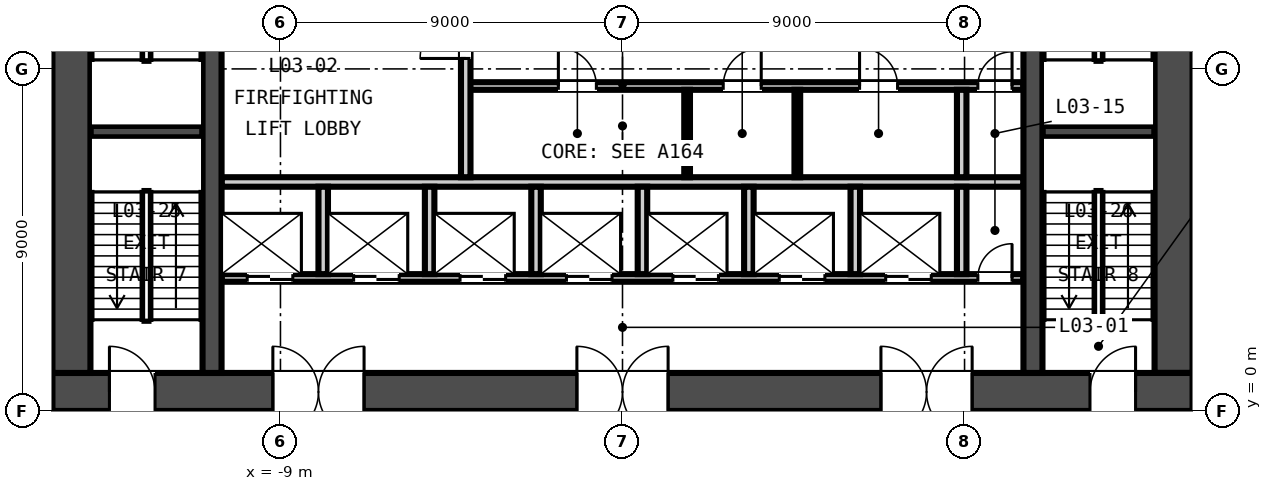
"""IFC4 building model, lengths in metres.
Left out: names, types, materials, properties, quantities, classifications, styles, units other than length and angle.
Written with IfcOpenShell. Run it as: python <this file> out.ifc"""

import sys

from ifc_helpers import new_model, si_unit, direction, frame, frame_2d, origin, place, context, subcontext, project, spatial, rectangle, extrude, element, fill, save


model = new_model("IFC4")
c1 = context("Model", 3, precision=1e-05, world=origin(), true_north=direction((0.0, 1.0)))
c2 = subcontext(c1, "Body", "Model", "MODEL_VIEW")
j1 = project(units=[si_unit("LENGTHUNIT", "METRE"), si_unit("PLANEANGLEUNIT", "RADIAN")], contexts=[c1])
p1 = place(None, origin())
s1 = spatial("IfcSite", under=j1, at=p1, CompositionType="ELEMENT")
p2 = place(p1, origin())
s2 = spatial("IfcBuilding", under=s1, at=p2, CompositionType="ELEMENT")
p3 = place(p2, frame((0.0, 0.0, 22.5)))
s3 = spatial("IfcBuildingStorey", under=s2, at=p3, CompositionType="ELEMENT", Elevation=22.5)
p4 = place(p3, frame((-15.0, 0.5, -0.3), z_axis=(0.0, 0.0, 1.0), x_axis=(1.0, 0.0, 0.0)))
e1 = element("IfcWall", 1, at=p4, inside=s3, PredefinedType="SOLIDWALL", context=c2, shape_type="SweptSolid", body=[
    extrude(rectangle(XDim=30.0, YDim=1.0, at=frame_2d((15.0, 0.0))), origin(), (0.0, 0.0, 1.0), 4.5),
])
p5 = place(p4, frame((5.8, 0.0, 0.3)))
e2 = element("IfcOpeningElement", 2, at=p5, cuts=e1, PredefinedType="OPENING", context=c2, shape_type="SweptSolid", body=[
    extrude(rectangle(XDim=2.4, YDim=2.4, at=frame_2d((1.2, 1.2))), frame((0.0, 0.51, 0.0), z_axis=(0.0, -1.0, 0.0), x_axis=(1.0, 0.0, 0.0)), (0.0, 0.0, 1.0), 1.02),
])
p6 = place(p4, frame((13.8, 0.0, 0.3)))
e3 = element("IfcOpeningElement", 3, at=p6, cuts=e1, PredefinedType="OPENING", context=c2, shape_type="SweptSolid", body=[
    extrude(rectangle(XDim=2.4, YDim=2.4, at=frame_2d((1.2, 1.2))), frame((0.0, 0.51, 0.0), z_axis=(0.0, -1.0, 0.0), x_axis=(1.0, 0.0, 0.0)), (0.0, 0.0, 1.0), 1.02),
])
p7 = place(p4, frame((21.8, 0.0, 0.3)))
e4 = element("IfcOpeningElement", 4, at=p7, cuts=e1, PredefinedType="OPENING", context=c2, shape_type="SweptSolid", body=[
    extrude(rectangle(XDim=2.4, YDim=2.4, at=frame_2d((1.2, 1.2))), frame((0.0, 0.51, 0.0), z_axis=(0.0, -1.0, 0.0), x_axis=(1.0, 0.0, 0.0)), (0.0, 0.0, 1.0), 1.02),
])
p8 = place(p4, frame((1.5, 0.0, 0.3)))
e5 = element("IfcOpeningElement", 5, at=p8, cuts=e1, PredefinedType="OPENING", context=c2, shape_type="SweptSolid", body=[
    extrude(rectangle(XDim=1.2, YDim=2.1, at=frame_2d((0.6, 1.05))), frame((0.0, 0.51, 0.0), z_axis=(0.0, -1.0, 0.0), x_axis=(1.0, 0.0, 0.0)), (0.0, 0.0, 1.0), 1.02),
])
p9 = place(p4, frame((27.3, 0.0, 0.3)))
e6 = element("IfcOpeningElement", 6, at=p9, cuts=e1, PredefinedType="OPENING", context=c2, shape_type="SweptSolid", body=[
    extrude(rectangle(XDim=1.2, YDim=2.1, at=frame_2d((0.6, 1.05))), frame((0.0, 0.51, 0.0), z_axis=(0.0, -1.0, 0.0), x_axis=(1.0, 0.0, 0.0)), (0.0, 0.0, 1.0), 1.02),
])
for number, where, z_axis, x_axis in (
    (7, (-14.5, 1.0, -0.3), (0.0, 0.0, 1.0), (0.0, 1.0, 0.0)),
    (8, (14.5, 1.0, -0.3), (0.0, 0.0, 1.0), (0.0, 1.0, 0.0)),
):
    element("IfcWall", number, at=place(p3, frame(where, z_axis=z_axis, x_axis=x_axis)), inside=s3, PredefinedType="SOLIDWALL", context=c2, shape_type="SweptSolid", body=[
        extrude(rectangle(XDim=13.0, YDim=1.0, at=frame_2d((6.5, 0.0))), origin(), (0.0, 0.0, 1.0), 4.5),
    ])
for number, where, z_axis, x_axis in (
    (9, (-10.8, 1.0, -0.3), (0.0, 0.0, 1.0), (0.0, 1.0, 0.0)),
    (10, (10.8, 1.0, -0.3), (0.0, 0.0, 1.0), (0.0, 1.0, 0.0)),
):
    element("IfcWall", number, at=place(p3, frame(where, z_axis=z_axis, x_axis=x_axis)), inside=s3, PredefinedType="SOLIDWALL", context=c2, shape_type="SweptSolid", body=[
        extrude(rectangle(XDim=13.0, YDim=0.5, at=frame_2d((6.5, 0.0))), origin(), (0.0, 0.0, 1.0), 4.5),
    ])
p10 = place(p3, frame((-10.55, 3.5, 0.0), z_axis=(0.0, 0.0, 1.0), x_axis=(1.0, 0.0, 0.0)))
e11 = element("IfcWall", 11, at=p10, inside=s3, PredefinedType="PARTITIONING", context=c2, shape_type="SweptSolid", body=[
    extrude(rectangle(XDim=21.1, YDim=0.2, at=frame_2d((10.55, 0.0))), origin(), (0.0, 0.0, 1.0), 4.2),
])
p11 = place(p10, frame((0.675, 0.0, 0.0)))
e12 = element("IfcOpeningElement", 12, at=p11, cuts=e11, PredefinedType="OPENING", context=c2, shape_type="SweptSolid", body=[
    extrude(rectangle(XDim=1.2, YDim=2.1, at=frame_2d((0.6, 1.05))), frame((0.0, 0.11, 0.0), z_axis=(0.0, -1.0, 0.0), x_axis=(1.0, 0.0, 0.0)), (0.0, 0.0, 1.0), 0.22),
])
p12 = place(p10, frame((3.475, 0.0, 0.0)))
e13 = element("IfcOpeningElement", 13, at=p12, cuts=e11, PredefinedType="OPENING", context=c2, shape_type="SweptSolid", body=[
    extrude(rectangle(XDim=1.2, YDim=2.1, at=frame_2d((0.6, 1.05))), frame((0.0, 0.11, 0.0), z_axis=(0.0, -1.0, 0.0), x_axis=(1.0, 0.0, 0.0)), (0.0, 0.0, 1.0), 0.22),
])
p13 = place(p10, frame((6.275, 0.0, 0.0)))
e14 = element("IfcOpeningElement", 14, at=p13, cuts=e11, PredefinedType="OPENING", context=c2, shape_type="SweptSolid", body=[
    extrude(rectangle(XDim=1.2, YDim=2.1, at=frame_2d((0.6, 1.05))), frame((0.0, 0.11, 0.0), z_axis=(0.0, -1.0, 0.0), x_axis=(1.0, 0.0, 0.0)), (0.0, 0.0, 1.0), 0.22),
])
p14 = place(p10, frame((9.075, 0.0, 0.0)))
e15 = element("IfcOpeningElement", 15, at=p14, cuts=e11, PredefinedType="OPENING", context=c2, shape_type="SweptSolid", body=[
    extrude(rectangle(XDim=1.2, YDim=2.1, at=frame_2d((0.6, 1.05))), frame((0.0, 0.11, 0.0), z_axis=(0.0, -1.0, 0.0), x_axis=(1.0, 0.0, 0.0)), (0.0, 0.0, 1.0), 0.22),
])
p15 = place(p10, frame((11.875, 0.0, 0.0)))
e16 = element("IfcOpeningElement", 16, at=p15, cuts=e11, PredefinedType="OPENING", context=c2, shape_type="SweptSolid", body=[
    extrude(rectangle(XDim=1.2, YDim=2.1, at=frame_2d((0.6, 1.05))), frame((0.0, 0.11, 0.0), z_axis=(0.0, -1.0, 0.0), x_axis=(1.0, 0.0, 0.0)), (0.0, 0.0, 1.0), 0.22),
])
p16 = place(p10, frame((14.675, 0.0, 0.0)))
e17 = element("IfcOpeningElement", 17, at=p16, cuts=e11, PredefinedType="OPENING", context=c2, shape_type="SweptSolid", body=[
    extrude(rectangle(XDim=1.2, YDim=2.1, at=frame_2d((0.6, 1.05))), frame((0.0, 0.11, 0.0), z_axis=(0.0, -1.0, 0.0), x_axis=(1.0, 0.0, 0.0)), (0.0, 0.0, 1.0), 0.22),
])
p17 = place(p10, frame((17.475, 0.0, 0.0)))
e18 = element("IfcOpeningElement", 18, at=p17, cuts=e11, PredefinedType="OPENING", context=c2, shape_type="SweptSolid", body=[
    extrude(rectangle(XDim=1.2, YDim=2.1, at=frame_2d((0.6, 1.05))), frame((0.0, 0.11, 0.0), z_axis=(0.0, -1.0, 0.0), x_axis=(1.0, 0.0, 0.0)), (0.0, 0.0, 1.0), 0.22),
])
p18 = place(p10, frame((19.9, 0.0, 0.0)))
e19 = element("IfcOpeningElement", 19, at=p18, cuts=e11, PredefinedType="OPENING", context=c2, shape_type="SweptSolid", body=[
    extrude(rectangle(XDim=0.9, YDim=2.1, at=frame_2d((0.45, 1.05))), frame((0.0, 0.11, 0.0), z_axis=(0.0, -1.0, 0.0), x_axis=(1.0, 0.0, 0.0)), (0.0, 0.0, 1.0), 0.22),
])
p19 = place(p3, frame((-10.55, 6.025, 0.0), z_axis=(0.0, 0.0, 1.0), x_axis=(1.0, 0.0, 0.0)))
e20 = element("IfcWall", 20, at=p19, inside=s3, PredefinedType="PARTITIONING", context=c2, shape_type="SweptSolid", body=[
    extrude(rectangle(XDim=21.1, YDim=0.25, at=frame_2d((10.55, 0.0))), origin(), (0.0, 0.0, 1.0), 4.2),
])
p20 = place(p3, frame((-4.125, 8.55, 0.0), z_axis=(0.0, 0.0, 1.0), x_axis=(1.0, 0.0, 0.0)))
e21 = element("IfcWall", 21, at=p20, inside=s3, PredefinedType="PARTITIONING", context=c2, shape_type="SweptSolid", body=[
    extrude(rectangle(XDim=14.675, YDim=0.2, at=frame_2d((7.337, 0.0))), origin(), (0.0, 0.0, 1.0), 4.2),
])
p21 = place(p20, frame((2.438, 0.0, 0.0)))
e22 = element("IfcOpeningElement", 22, at=p21, cuts=e21, PredefinedType="OPENING", context=c2, shape_type="SweptSolid", body=[
    extrude(rectangle(XDim=1.0, YDim=2.1, at=frame_2d((0.5, 1.05))), frame((0.0, 0.11, 0.0), z_axis=(0.0, -1.0, 0.0), x_axis=(1.0, 0.0, 0.0)), (0.0, 0.0, 1.0), 0.22),
])
p22 = place(p20, frame((6.775, 0.0, 0.0)))
e23 = element("IfcOpeningElement", 23, at=p22, cuts=e21, PredefinedType="OPENING", context=c2, shape_type="SweptSolid", body=[
    extrude(rectangle(XDim=1.0, YDim=2.1, at=frame_2d((0.5, 1.05))), frame((0.0, 0.11, 0.0), z_axis=(0.0, -1.0, 0.0), x_axis=(1.0, 0.0, 0.0)), (0.0, 0.0, 1.0), 0.22),
])
p23 = place(p20, frame((10.363, 0.0, 0.0)))
e24 = element("IfcOpeningElement", 24, at=p23, cuts=e21, PredefinedType="OPENING", context=c2, shape_type="SweptSolid", body=[
    extrude(rectangle(XDim=1.0, YDim=2.1, at=frame_2d((0.5, 1.05))), frame((0.0, 0.11, 0.0), z_axis=(0.0, -1.0, 0.0), x_axis=(1.0, 0.0, 0.0)), (0.0, 0.0, 1.0), 0.22),
])
p24 = place(p20, frame((13.475, 0.0, 0.0)))
e25 = element("IfcOpeningElement", 25, at=p24, cuts=e21, PredefinedType="OPENING", context=c2, shape_type="SweptSolid", body=[
    extrude(rectangle(XDim=0.9, YDim=2.1, at=frame_2d((0.45, 1.05))), frame((0.0, 0.11, 0.0), z_axis=(0.0, -1.0, 0.0), x_axis=(1.0, 0.0, 0.0)), (0.0, 0.0, 1.0), 0.22),
])
p25 = place(p3, frame((-4.125, 6.15, 0.0), z_axis=(0.0, 0.0, 1.0), x_axis=(0.0, 1.0, 0.0)))
e26 = element("IfcWall", 26, at=p25, inside=s3, PredefinedType="PARTITIONING", context=c2, shape_type="SweptSolid", body=[
    extrude(rectangle(XDim=4.95, YDim=0.25, at=frame_2d((2.475, 0.0))), origin(), (0.0, 0.0, 1.0), 4.2),
])
p26 = place(p25, frame((3.125, 0.0, 0.0)))
e27 = element("IfcOpeningElement", 27, at=p26, cuts=e26, PredefinedType="OPENING", context=c2, shape_type="SweptSolid", body=[
    extrude(rectangle(XDim=1.2, YDim=2.1, at=frame_2d((0.6, 1.05))), frame((0.0, 0.135, 0.0), z_axis=(0.0, -1.0, 0.0), x_axis=(1.0, 0.0, 0.0)), (0.0, 0.0, 1.0), 0.27),
])
for number, where, z_axis, x_axis in (
    (28, (-7.875, 3.6, 0.0), (0.0, 0.0, 1.0), (0.0, 1.0, 0.0)),
    (29, (-5.075, 3.6, 0.0), (0.0, 0.0, 1.0), (0.0, 1.0, 0.0)),
    (30, (-2.275, 3.6, 0.0), (0.0, 0.0, 1.0), (0.0, 1.0, 0.0)),
    (31, (0.525, 3.6, 0.0), (0.0, 0.0, 1.0), (0.0, 1.0, 0.0)),
    (32, (3.325, 3.6, 0.0), (0.0, 0.0, 1.0), (0.0, 1.0, 0.0)),
    (33, (6.125, 3.6, 0.0), (0.0, 0.0, 1.0), (0.0, 1.0, 0.0)),
    (34, (8.925, 3.6, 0.0), (0.0, 0.0, 1.0), (0.0, 1.0, 0.0)),
):
    element("IfcWall", number, at=place(p3, frame(where, z_axis=z_axis, x_axis=x_axis)), inside=s3, PredefinedType="PARTITIONING", context=c2, shape_type="SweptSolid", body=[
        extrude(rectangle(XDim=2.3, YDim=0.25, at=frame_2d((1.15, 0.0))), origin(), (0.0, 0.0, 1.0), 4.2),
    ])
for number, where, z_axis, x_axis in (
    (35, (1.7, 6.15, 0.0), (0.0, 0.0, 1.0), (0.0, 1.0, 0.0)),
    (36, (4.6, 6.15, 0.0), (0.0, 0.0, 1.0), (0.0, 1.0, 0.0)),
):
    element("IfcWall", number, at=place(p3, frame(where, z_axis=z_axis, x_axis=x_axis)), inside=s3, PredefinedType="PARTITIONING", context=c2, shape_type="SweptSolid", body=[
        extrude(rectangle(XDim=2.3, YDim=0.15, at=frame_2d((1.15, 0.0))), origin(), (0.0, 0.0, 1.0), 4.2),
    ])
p27 = place(p3, frame((8.925, 6.15, 0.0), z_axis=(0.0, 0.0, 1.0), x_axis=(0.0, 1.0, 0.0)))
e37 = element("IfcWall", 37, at=p27, inside=s3, PredefinedType="PARTITIONING", context=c2, shape_type="SweptSolid", body=[
    extrude(rectangle(XDim=2.3, YDim=0.25, at=frame_2d((1.15, 0.0))), origin(), (0.0, 0.0, 1.0), 4.2),
])
for number, where, z_axis, x_axis in (
    (38, (-14.0, 7.35, -0.3), (0.0, 0.0, 1.0), (1.0, 0.0, 0.0)),
    (39, (11.05, 7.35, -0.3), (0.0, 0.0, 1.0), (1.0, 0.0, 0.0)),
):
    element("IfcWall", number, at=place(p3, frame(where, z_axis=z_axis, x_axis=x_axis)), inside=s3, PredefinedType="SOLIDWALL", context=c2, shape_type="SweptSolid", body=[
        extrude(rectangle(XDim=2.95, YDim=0.3, at=frame_2d((1.475, 0.0))), origin(), (0.0, 0.0, 1.0), 4.5),
    ])
p28 = place(p26, origin())
e40 = element("IfcDoor", 40, at=p28, inside=s3, OperationType="SINGLE_SWING_LEFT", PredefinedType="DOOR", context=c2, shape_type="SweptSolid", body=[
    extrude(rectangle(XDim=1.2, YDim=2.1, at=frame_2d((0.6, 1.05))), frame((0.0, 0.025, 0.0), z_axis=(0.0, -1.0, 0.0), x_axis=(1.0, 0.0, 0.0)), (0.0, 0.0, 1.0), 0.05),
])
fill(e27, e40)
p29 = place(p11, origin())
e41 = element("IfcDoor", 41, at=p29, inside=s3, OperationType="DOUBLE_DOOR_SLIDING", PredefinedType="DOOR", context=c2, shape_type="SweptSolid", body=[
    extrude(rectangle(XDim=1.2, YDim=2.1, at=frame_2d((0.6, 1.05))), frame((0.0, 0.025, 0.0), z_axis=(0.0, -1.0, 0.0), x_axis=(1.0, 0.0, 0.0)), (0.0, 0.0, 1.0), 0.05),
])
fill(e12, e41)
p30 = place(p12, origin())
e42 = element("IfcDoor", 42, at=p30, inside=s3, OperationType="DOUBLE_DOOR_SLIDING", PredefinedType="DOOR", context=c2, shape_type="SweptSolid", body=[
    extrude(rectangle(XDim=1.2, YDim=2.1, at=frame_2d((0.6, 1.05))), frame((0.0, 0.025, 0.0), z_axis=(0.0, -1.0, 0.0), x_axis=(1.0, 0.0, 0.0)), (0.0, 0.0, 1.0), 0.05),
])
fill(e13, e42)
p31 = place(p13, origin())
e43 = element("IfcDoor", 43, at=p31, inside=s3, OperationType="DOUBLE_DOOR_SLIDING", PredefinedType="DOOR", context=c2, shape_type="SweptSolid", body=[
    extrude(rectangle(XDim=1.2, YDim=2.1, at=frame_2d((0.6, 1.05))), frame((0.0, 0.025, 0.0), z_axis=(0.0, -1.0, 0.0), x_axis=(1.0, 0.0, 0.0)), (0.0, 0.0, 1.0), 0.05),
])
fill(e14, e43)
p32 = place(p14, origin())
e44 = element("IfcDoor", 44, at=p32, inside=s3, OperationType="DOUBLE_DOOR_SLIDING", PredefinedType="DOOR", context=c2, shape_type="SweptSolid", body=[
    extrude(rectangle(XDim=1.2, YDim=2.1, at=frame_2d((0.6, 1.05))), frame((0.0, 0.025, 0.0), z_axis=(0.0, -1.0, 0.0), x_axis=(1.0, 0.0, 0.0)), (0.0, 0.0, 1.0), 0.05),
])
fill(e15, e44)
p33 = place(p15, origin())
e45 = element("IfcDoor", 45, at=p33, inside=s3, OperationType="DOUBLE_DOOR_SLIDING", PredefinedType="DOOR", context=c2, shape_type="SweptSolid", body=[
    extrude(rectangle(XDim=1.2, YDim=2.1, at=frame_2d((0.6, 1.05))), frame((0.0, 0.025, 0.0), z_axis=(0.0, -1.0, 0.0), x_axis=(1.0, 0.0, 0.0)), (0.0, 0.0, 1.0), 0.05),
])
fill(e16, e45)
p34 = place(p16, origin())
e46 = element("IfcDoor", 46, at=p34, inside=s3, OperationType="DOUBLE_DOOR_SLIDING", PredefinedType="DOOR", context=c2, shape_type="SweptSolid", body=[
    extrude(rectangle(XDim=1.2, YDim=2.1, at=frame_2d((0.6, 1.05))), frame((0.0, 0.025, 0.0), z_axis=(0.0, -1.0, 0.0), x_axis=(1.0, 0.0, 0.0)), (0.0, 0.0, 1.0), 0.05),
])
fill(e17, e46)
p35 = place(p17, origin())
e47 = element("IfcDoor", 47, at=p35, inside=s3, OperationType="DOUBLE_DOOR_SLIDING", PredefinedType="DOOR", context=c2, shape_type="SweptSolid", body=[
    extrude(rectangle(XDim=1.2, YDim=2.1, at=frame_2d((0.6, 1.05))), frame((0.0, 0.025, 0.0), z_axis=(0.0, -1.0, 0.0), x_axis=(1.0, 0.0, 0.0)), (0.0, 0.0, 1.0), 0.05),
])
fill(e18, e47)
p36 = place(p18, origin())
e48 = element("IfcDoor", 48, at=p36, inside=s3, OperationType="SINGLE_SWING_RIGHT", PredefinedType="DOOR", context=c2, shape_type="SweptSolid", body=[
    extrude(rectangle(XDim=0.9, YDim=2.1, at=frame_2d((0.45, 1.05))), frame((0.0, 0.025, 0.0), z_axis=(0.0, -1.0, 0.0), x_axis=(1.0, 0.0, 0.0)), (0.0, 0.0, 1.0), 0.05),
])
fill(e19, e48)
p37 = place(p21, origin())
e49 = element("IfcDoor", 49, at=p37, inside=s3, OperationType="SINGLE_SWING_LEFT", PredefinedType="DOOR", context=c2, shape_type="SweptSolid", body=[
    extrude(rectangle(XDim=1.0, YDim=2.1, at=frame_2d((0.5, 1.05))), frame((0.0, 0.025, 0.0), z_axis=(0.0, -1.0, 0.0), x_axis=(1.0, 0.0, 0.0)), (0.0, 0.0, 1.0), 0.05),
])
fill(e22, e49)
p38 = place(p22, origin())
e50 = element("IfcDoor", 50, at=p38, inside=s3, OperationType="SINGLE_SWING_RIGHT", PredefinedType="DOOR", context=c2, shape_type="SweptSolid", body=[
    extrude(rectangle(XDim=1.0, YDim=2.1, at=frame_2d((0.5, 1.05))), frame((0.0, 0.025, 0.0), z_axis=(0.0, -1.0, 0.0), x_axis=(1.0, 0.0, 0.0)), (0.0, 0.0, 1.0), 0.05),
])
fill(e23, e50)
p39 = place(p23, origin())
e51 = element("IfcDoor", 51, at=p39, inside=s3, OperationType="SINGLE_SWING_LEFT", PredefinedType="DOOR", context=c2, shape_type="SweptSolid", body=[
    extrude(rectangle(XDim=1.0, YDim=2.1, at=frame_2d((0.5, 1.05))), frame((0.0, 0.025, 0.0), z_axis=(0.0, -1.0, 0.0), x_axis=(1.0, 0.0, 0.0)), (0.0, 0.0, 1.0), 0.05),
])
fill(e24, e51)
p40 = place(p24, origin())
e52 = element("IfcDoor", 52, at=p40, inside=s3, OperationType="SINGLE_SWING_RIGHT", PredefinedType="DOOR", context=c2, shape_type="SweptSolid", body=[
    extrude(rectangle(XDim=0.9, YDim=2.1, at=frame_2d((0.45, 1.05))), frame((0.0, 0.025, 0.0), z_axis=(0.0, -1.0, 0.0), x_axis=(1.0, 0.0, 0.0)), (0.0, 0.0, 1.0), 0.05),
])
fill(e25, e52)
p41 = place(p5, origin())
e53 = element("IfcDoor", 53, at=p41, inside=s3, OperationType="DOUBLE_DOOR_DOUBLE_SWING", PredefinedType="DOOR", context=c2, shape_type="SweptSolid", body=[
    extrude(rectangle(XDim=2.4, YDim=2.4, at=frame_2d((1.2, 1.2))), frame((0.0, 0.025, 0.0), z_axis=(0.0, -1.0, 0.0), x_axis=(1.0, 0.0, 0.0)), (0.0, 0.0, 1.0), 0.05),
])
fill(e2, e53)
p42 = place(p6, origin())
e54 = element("IfcDoor", 54, at=p42, inside=s3, OperationType="DOUBLE_DOOR_DOUBLE_SWING", PredefinedType="DOOR", context=c2, shape_type="SweptSolid", body=[
    extrude(rectangle(XDim=2.4, YDim=2.4, at=frame_2d((1.2, 1.2))), frame((0.0, 0.025, 0.0), z_axis=(0.0, -1.0, 0.0), x_axis=(1.0, 0.0, 0.0)), (0.0, 0.0, 1.0), 0.05),
])
fill(e3, e54)
p43 = place(p7, origin())
e55 = element("IfcDoor", 55, at=p43, inside=s3, OperationType="DOUBLE_DOOR_DOUBLE_SWING", PredefinedType="DOOR", context=c2, shape_type="SweptSolid", body=[
    extrude(rectangle(XDim=2.4, YDim=2.4, at=frame_2d((1.2, 1.2))), frame((0.0, 0.025, 0.0), z_axis=(0.0, -1.0, 0.0), x_axis=(1.0, 0.0, 0.0)), (0.0, 0.0, 1.0), 0.05),
])
fill(e4, e55)
p44 = place(p8, origin())
e56 = element("IfcDoor", 56, at=p44, inside=s3, OperationType="SINGLE_SWING_LEFT", PredefinedType="DOOR", context=c2, shape_type="SweptSolid", body=[
    extrude(rectangle(XDim=1.2, YDim=2.1, at=frame_2d((0.6, 1.05))), frame((0.0, 0.025, 0.0), z_axis=(0.0, -1.0, 0.0), x_axis=(1.0, 0.0, 0.0)), (0.0, 0.0, 1.0), 0.05),
])
fill(e5, e56)
p45 = place(p9, origin())
e57 = element("IfcDoor", 57, at=p45, inside=s3, OperationType="SINGLE_SWING_RIGHT", PredefinedType="DOOR", context=c2, shape_type="SweptSolid", body=[
    extrude(rectangle(XDim=1.2, YDim=2.1, at=frame_2d((0.6, 1.05))), frame((0.0, 0.025, 0.0), z_axis=(0.0, -1.0, 0.0), x_axis=(1.0, 0.0, 0.0)), (0.0, 0.0, 1.0), 0.05),
])
fill(e6, e57)
save(model, sys.argv[1])
